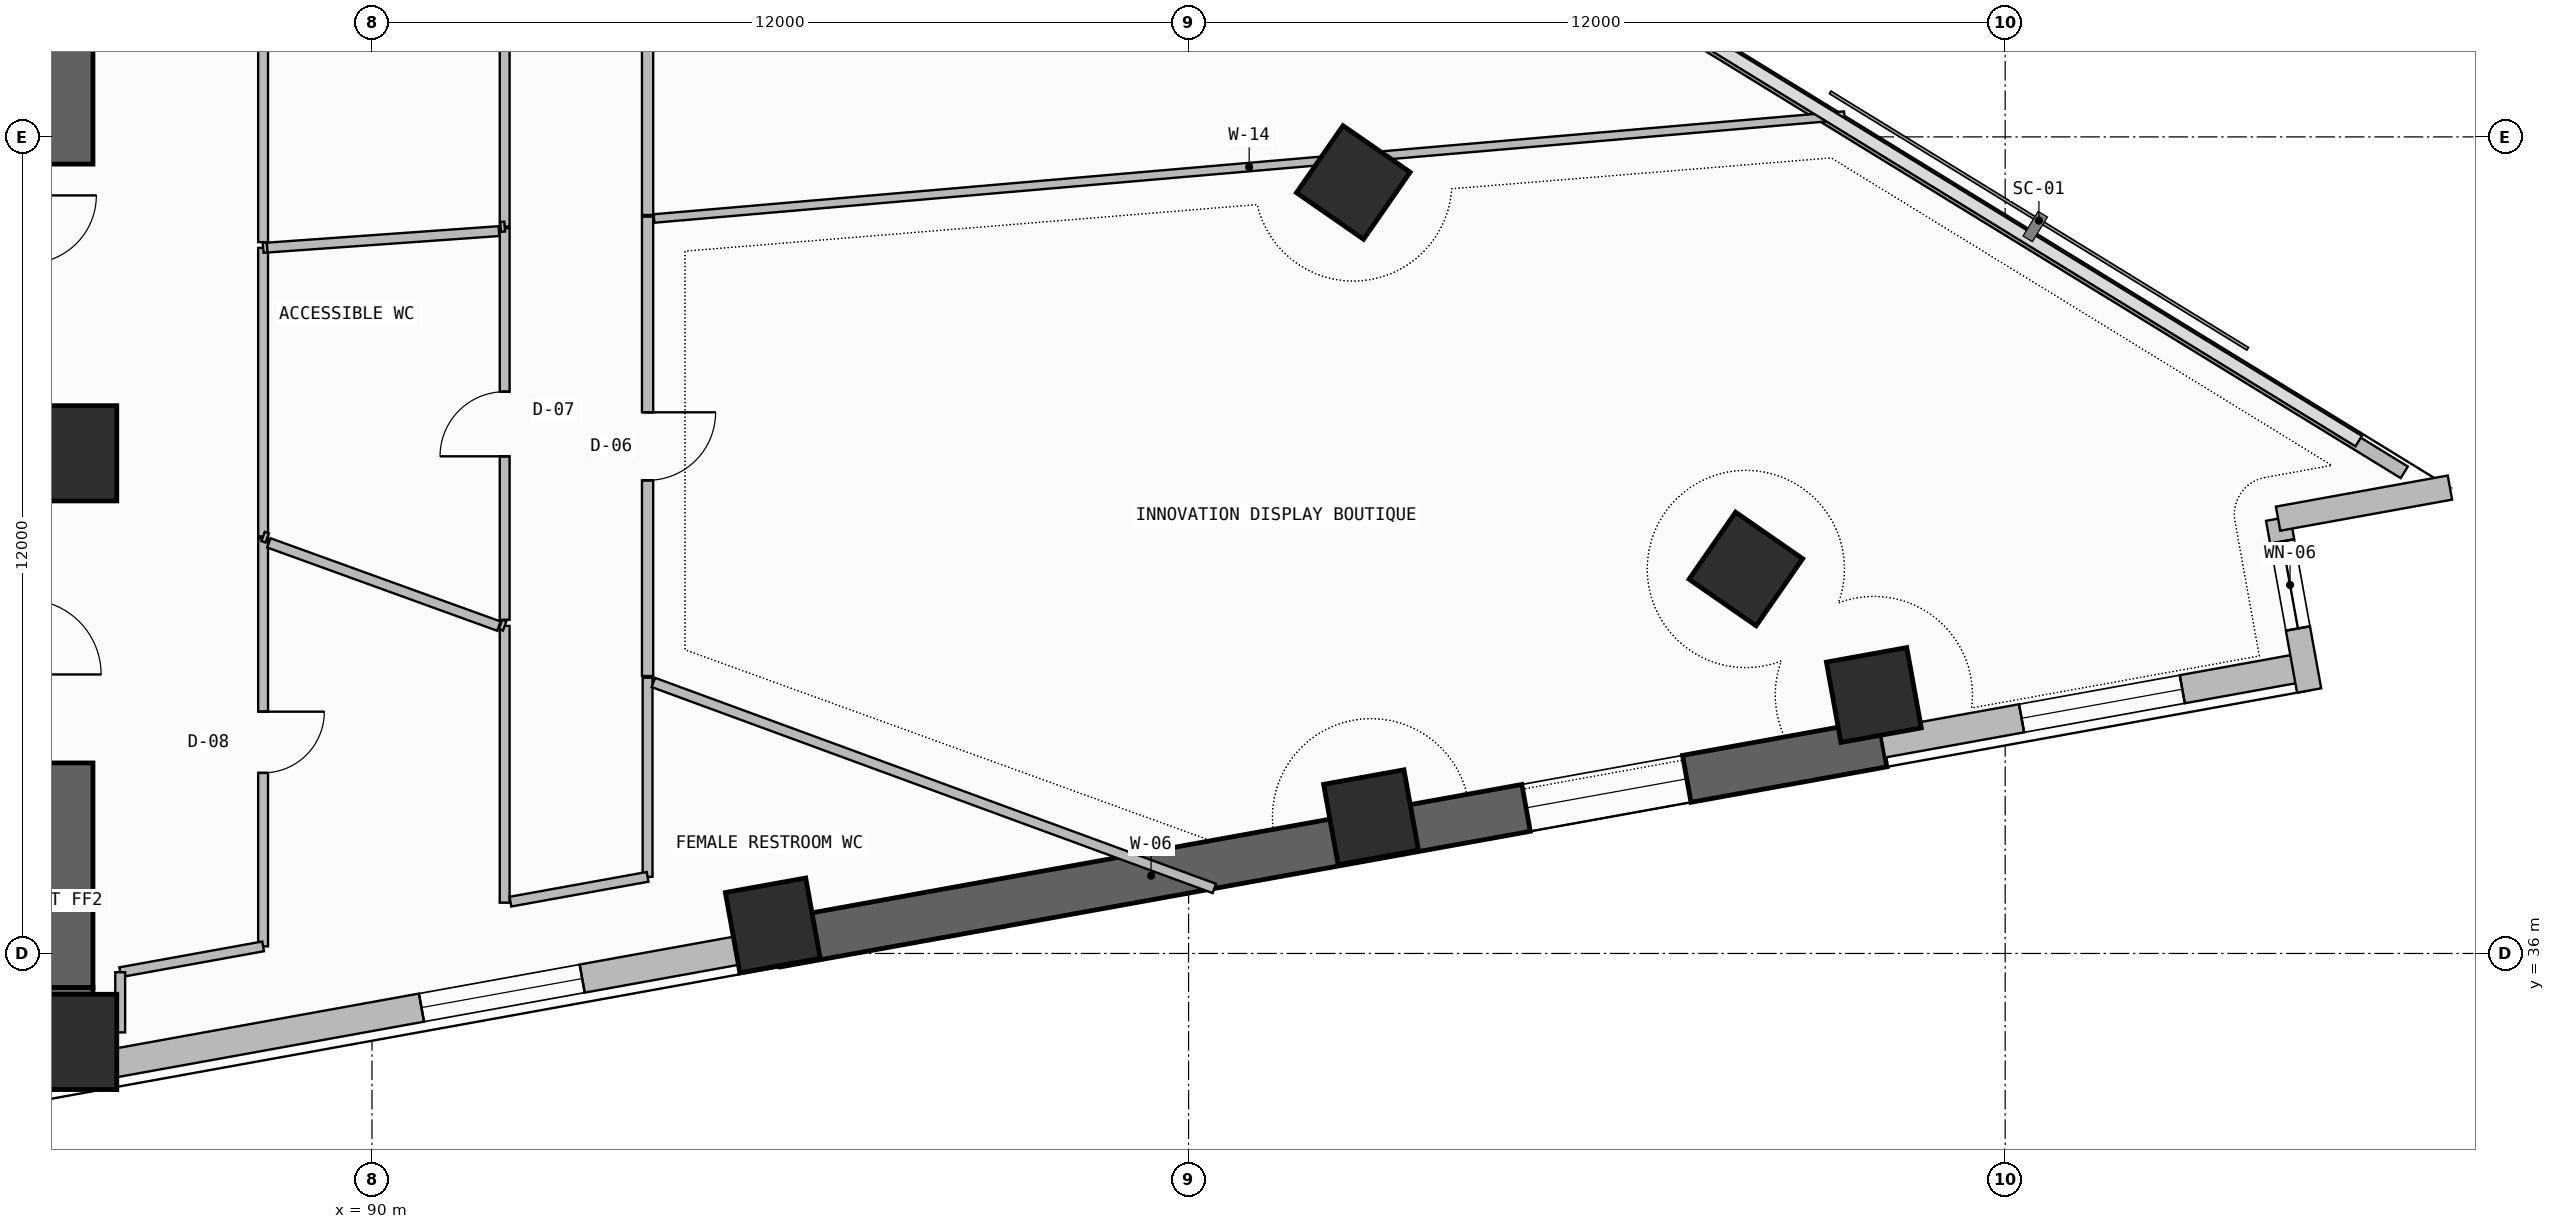
"""IFC4 building model, lengths in metres.
Left out: names, types, materials, properties, quantities, classifications, styles, units other than length and angle.
Written with IfcOpenShell. Run it as: python <this file> out.ifc"""

import sys

from ifc_helpers import new_model, si_unit, direction, frame, frame_2d, origin, origin_2d, place, context, subcontext, project, spatial, rectangle, extrude, element, fill, save


model = new_model("IFC4")
c1 = context("Model", 3, precision=1e-05, world=origin(), true_north=direction((0.0, 1.0)))
c2 = subcontext(c1, "Body", "Model", "MODEL_VIEW")
j1 = project(units=[si_unit("LENGTHUNIT", "METRE"), si_unit("PLANEANGLEUNIT", "RADIAN")], contexts=[c1])
p1 = place(None, origin())
s1 = spatial("IfcSite", under=j1, at=p1, CompositionType="ELEMENT")
p2 = place(p1, origin())
s2 = spatial("IfcBuilding", under=s1, at=p2, CompositionType="ELEMENT")
p3 = place(p2, frame((0.0, 0.0, 120.9)))
s3 = spatial("IfcBuildingStorey", under=s2, at=p3, CompositionType="ELEMENT", Elevation=120.9)
p4 = place(p3, frame((72.0, 35.05, -0.26), z_axis=(0.0, 0.0, 1.0), x_axis=(1.0, 0.0, 0.0)))
e1 = element("IfcWall", 1, at=p4, inside=s3, PredefinedType="SHEAR", context=c2, shape_type="SweptSolid", body=[
    extrude(rectangle(XDim=13.9, YDim=0.9, at=frame_2d((6.95, 0.0))), origin(), (0.0, 0.0, 1.0), 3.6),
])
p5 = place(p3, frame((85.45, 35.5, -0.26), z_axis=(0.0, 0.0, 1.0), x_axis=(0.0, 1.0, 0.0)))
e2 = element("IfcWall", 2, at=p5, inside=s3, PredefinedType="SHEAR", context=c2, shape_type="SweptSolid", body=[
    extrude(rectangle(XDim=3.3, YDim=0.9, at=frame_2d((1.65, 0.0))), origin(), (0.0, 0.0, 1.0), 3.6),
])
p6 = place(p3, frame((85.45, 47.6, -0.26), z_axis=(0.0, 0.0, 1.0), x_axis=(0.0, 1.0, 0.0)))
e3 = element("IfcWall", 3, at=p6, inside=s3, PredefinedType="SHEAR", context=c2, shape_type="SweptSolid", body=[
    extrude(rectangle(XDim=8.45, YDim=0.9, at=frame_2d((4.225, 0.0))), origin(), (0.0, 0.0, 1.0), 3.6),
])
for number, where, z_axis, x_axis in (
    (4, (85.55, 34.7, 0.0), (0.0, 0.0, 1.0), (1.0, 0.0, 0.0)),
    (5, (85.55, 43.35, 0.0), (0.0, 0.0, 1.0), (1.0, 0.0, 0.0)),
):
    element("IfcColumn", number, at=place(p3, frame(where, z_axis=z_axis, x_axis=x_axis)), inside=s3, PredefinedType="COLUMN", context=c2, shape_type="SweptSolid", body=[
        extrude(rectangle(XDim=1.4, YDim=1.4, at=origin_2d()), origin(), (0.0, 0.0, 1.0), 3.6),
    ])
for number, where, z_axis, x_axis in (
    (6, (95.89, 36.412, 0.0), (0.0, 0.0, 1.0), (0.984, 0.178, 0.0)),
    (7, (104.681, 38.001, 0.0), (0.0, 0.0, 1.0), (0.984, 0.178, 0.0)),
    (8, (112.07, 39.798, 0.0), (0.0, 0.0, 1.0), (0.984, 0.178, 0.0)),
    (9, (110.189, 41.65, 0.0), (0.0, 0.0, 1.0), (0.57, 0.822, 0.0)),
    (10, (104.42, 47.331, 0.0), (0.0, 0.0, 1.0), (0.57, 0.822, 0.0)),
):
    element("IfcColumn", number, at=place(p3, frame(where, z_axis=z_axis, x_axis=x_axis)), inside=s3, PredefinedType="COLUMN", context=c2, shape_type="SweptSolid", body=[
        extrude(rectangle(XDim=1.2, YDim=1.2, at=origin_2d()), origin(), (0.0, 0.0, 1.0), 3.6),
    ])
p7 = place(p3, frame((86.1, 34.367, 0.0), z_axis=(0.0, 0.0, 1.0), x_axis=(0.9840437071, 0.177926902172, 0.0)))
e11 = element("IfcWall", 11, at=p7, inside=s3, PredefinedType="SOLIDWALL", context=c2, shape_type="SweptSolid", body=[
    extrude(rectangle(XDim=9.997, YDim=0.42, at=frame_2d((4.999, 0.0))), origin(), (0.0, 0.0, 1.0), 2.325),
])
p8 = place(p7, frame((4.702, 0.0, 1.2)))
e12 = element("IfcOpeningElement", 12, at=p8, cuts=e11, PredefinedType="OPENING", context=c2, shape_type="SweptSolid", body=[
    extrude(rectangle(XDim=2.4, YDim=0.9, at=frame_2d((1.2, 0.45))), frame((0.0, 0.22, 0.0), z_axis=(0.0, -1.0, 0.0), x_axis=(1.0, 0.0, 0.0)), (0.0, 0.0, 1.0), 0.44),
])
p9 = place(p3, frame((95.938, 36.146, -0.26), z_axis=(0.0, 0.0, 1.0), x_axis=(0.984038488288, 0.177955762952, 0.0)))
e13 = element("IfcWall", 13, at=p9, inside=s3, PredefinedType="SHEAR", context=c2, shape_type="SweptSolid", body=[
    extrude(rectangle(XDim=16.525, YDim=0.7, at=frame_2d((8.262, 0.0))), origin(), (0.0, 0.0, 1.0), 3.6),
])
p10 = place(p9, frame((11.2, 0.0, 1.2)))
e14 = element("IfcOpeningElement", 14, at=p10, cuts=e13, PredefinedType="OPENING", context=c2, shape_type="SweptSolid", body=[
    extrude(rectangle(XDim=2.4, YDim=0.9, at=frame_2d((1.2, 0.45))), frame((0.0, 0.36, 0.0), z_axis=(0.0, -1.0, 0.0), x_axis=(1.0, 0.0, 0.0)), (0.0, 0.0, 1.0), 0.72),
])
p11 = place(p3, frame((112.199, 39.087, 0.0), z_axis=(0.0, 0.0, 1.0), x_axis=(0.984042888215, 0.177931431042, 0.0)))
e15 = element("IfcWall", 15, at=p11, inside=s3, PredefinedType="SOLIDWALL", context=c2, shape_type="SweptSolid", body=[
    extrude(rectangle(XDim=6.306, YDim=0.42, at=frame_2d((3.153, 0.0))), origin(), (0.0, 0.0, 1.0), 3.34),
])
p12 = place(p11, frame((2.075, 0.0, 1.2)))
e16 = element("IfcOpeningElement", 16, at=p12, cuts=e15, PredefinedType="OPENING", context=c2, shape_type="SweptSolid", body=[
    extrude(rectangle(XDim=2.4, YDim=0.9, at=frame_2d((1.2, 0.45))), frame((0.0, 0.22, 0.0), z_axis=(0.0, -1.0, 0.0), x_axis=(1.0, 0.0, 0.0)), (0.0, 0.0, 1.0), 0.44),
])
p13 = place(p3, frame((118.467, 39.864, 0.0), z_axis=(0.0, 0.0, 1.0), x_axis=(-0.177897493713, 0.984049024048, 0.0)))
e17 = element("IfcWall", 17, at=p13, inside=s3, PredefinedType="SOLIDWALL", context=c2, shape_type="SweptSolid", body=[
    extrude(rectangle(XDim=2.566, YDim=0.36, at=frame_2d((1.283, 0.0))), origin(), (0.0, 0.0, 1.0), 3.34),
])
p14 = place(p13, frame((0.926, 0.0, 0.45)))
e18 = element("IfcOpeningElement", 18, at=p14, cuts=e17, PredefinedType="OPENING", context=c2, shape_type="SweptSolid", body=[
    extrude(rectangle(XDim=1.3, YDim=2.4, at=frame_2d((0.65, 1.2))), frame((0.0, 0.19, 0.0), z_axis=(0.0, -1.0, 0.0), x_axis=(1.0, 0.0, 0.0)), (0.0, 0.0, 1.0), 0.38),
])
p15 = place(p3, frame((118.01, 42.39, 0.0), z_axis=(0.0, 0.0, 1.0), x_axis=(0.984046012923, 0.177914149102, 0.0)))
e19 = element("IfcWall", 19, at=p15, inside=s3, PredefinedType="SOLIDWALL", context=c2, shape_type="SweptSolid", body=[
    extrude(rectangle(XDim=2.566, YDim=0.36, at=frame_2d((1.283, 0.0))), origin(), (0.0, 0.0, 1.0), 3.34),
])
p16 = place(p3, frame((119.865, 43.07, 0.0), z_axis=(0.0, 0.0, 1.0), x_axis=(-0.852110824326, 0.52336138859, 0.0)))
e20 = element("IfcWall", 20, at=p16, inside=s3, PredefinedType="PARAPET", context=c2, shape_type="SweptSolid", body=[
    extrude(rectangle(XDim=33.932, YDim=0.2, at=frame_2d((16.966, 0.0))), origin(), (0.0, 0.0, 1.0), 1.15),
])
p17 = place(p3, frame((88.4, 36.104, 0.0), z_axis=(0.0, 0.0, 1.0), x_axis=(0.0, 1.0, 0.0)))
e21 = element("IfcWall", 21, at=p17, inside=s3, PredefinedType="PARTITIONING", context=c2, shape_type="SweptSolid", body=[
    extrude(rectangle(XDim=5.999, YDim=0.145, at=frame_2d((2.999, 0.0))), origin(), (0.0, 0.0, 1.0), 3.34),
])
p18 = place(p17, frame((2.549, 0.0, 0.0)))
e22 = element("IfcOpeningElement", 22, at=p18, cuts=e21, PredefinedType="OPENING", context=c2, shape_type="SweptSolid", body=[
    extrude(rectangle(XDim=0.9, YDim=2.1, at=frame_2d((0.45, 1.05))), frame((0.0, 0.083, 0.0), z_axis=(0.0, -1.0, 0.0), x_axis=(1.0, 0.0, 0.0)), (0.0, 0.0, 1.0), 0.165),
])
p19 = place(p3, frame((91.95, 40.814, 0.0), z_axis=(0.0, 0.0, 1.0), x_axis=(0.0, -1.0, 0.0)))
e23 = element("IfcWall", 23, at=p19, inside=s3, PredefinedType="PARTITIONING", context=c2, shape_type="SweptSolid", body=[
    extrude(rectangle(XDim=4.068, YDim=0.145, at=frame_2d((2.034, 0.0))), origin(), (0.0, 0.0, 1.0), 2.875),
])
p20 = place(p3, frame((94.05, 37.126, 0.0), z_axis=(0.0, 0.0, 1.0), x_axis=(0.0, 1.0, 0.0)))
e24 = element("IfcWall", 24, at=p20, inside=s3, PredefinedType="PARTITIONING", context=c2, shape_type="SweptSolid", body=[
    extrude(rectangle(XDim=2.926, YDim=0.145, at=frame_2d((1.463, 0.0))), origin(), (0.0, 0.0, 1.0), 2.875),
])
p21 = place(p3, frame((92.034, 36.761, 0.0), z_axis=(0.0, 0.0, 1.0), x_axis=(0.984039194934, 0.177951855382, 0.0)))
e25 = element("IfcWall", 25, at=p21, inside=s3, PredefinedType="PARTITIONING", context=c2, shape_type="SweptSolid", body=[
    extrude(rectangle(XDim=2.048, YDim=0.145, at=frame_2d((1.024, 0.0))), origin(), (0.0, 0.0, 1.0), 3.34),
])
p22 = place(p3, frame((86.3, 35.724, 0.0), z_axis=(0.0, 0.0, 1.0), x_axis=(0.984046990905, 0.177908739781, 0.0)))
e26 = element("IfcWall", 26, at=p22, inside=s3, PredefinedType="PARTITIONING", context=c2, shape_type="SweptSolid", body=[
    extrude(rectangle(XDim=2.134, YDim=0.145, at=frame_2d((1.067, 0.0))), origin(), (0.0, 0.0, 1.0), 3.34),
])
p23 = place(p3, frame((91.89, 40.836, 0.0), z_axis=(0.0, 0.0, 1.0), x_axis=(0.940350208768, -0.340208002359, 0.0)))
e27 = element("IfcWall", 27, at=p23, inside=s3, PredefinedType="PARTITIONING", context=c2, shape_type="SweptSolid", body=[
    extrude(rectangle(XDim=0.064, YDim=0.145, at=frame_2d((0.032, 0.0))), origin(), (0.0, 0.0, 1.0), 3.34),
])
p24 = place(p3, frame((88.485, 42.034, 0.0), z_axis=(0.0, 0.0, 1.0), x_axis=(0.940329543341, -0.340265117106, 0.0)))
e28 = element("IfcWall", 28, at=p24, inside=s3, PredefinedType="PARTITIONING", context=c2, shape_type="SweptSolid", body=[
    extrude(rectangle(XDim=3.595, YDim=0.145, at=frame_2d((1.798, 0.0))), origin(), (0.0, 0.0, 1.0), 3.34),
])
p25 = place(p3, frame((94.135, 39.982, 0.0), z_axis=(0.0, 0.0, 1.0), x_axis=(0.938707581667, -0.344714484931, 0.0)))
e29 = element("IfcWall", 29, at=p25, inside=s3, PredefinedType="PARTITIONING", context=c2, shape_type="SweptSolid", body=[
    extrude(rectangle(XDim=8.782, YDim=0.145, at=frame_2d((4.391, 0.0))), origin(), (0.0, 0.0, 1.0), 2.325),
])
p26 = place(p3, frame((91.95, 46.657, 0.0), z_axis=(0.0, 0.0, 1.0), x_axis=(0.0, -1.0, 0.0)))
e30 = element("IfcWall", 30, at=p26, inside=s3, PredefinedType="PARTITIONING", context=c2, shape_type="SweptSolid", body=[
    extrude(rectangle(XDim=5.754, YDim=0.145, at=frame_2d((2.877, 0.0))), origin(), (0.0, 0.0, 1.0), 2.725),
])
p27 = place(p26, frame((2.402, 0.0, 0.0)))
e31 = element("IfcOpeningElement", 31, at=p27, cuts=e30, PredefinedType="OPENING", context=c2, shape_type="SweptSolid", body=[
    extrude(rectangle(XDim=0.95, YDim=2.15, at=frame_2d((0.475, 1.075))), frame((0.0, 0.083, 0.0), z_axis=(0.0, -1.0, 0.0), x_axis=(1.0, 0.0, 0.0)), (0.0, 0.0, 1.0), 0.165),
])
p28 = place(p3, frame((88.4, 42.128, 0.0), z_axis=(0.0, 0.0, 1.0), x_axis=(0.0, 1.0, 0.0)))
e32 = element("IfcWall", 32, at=p28, inside=s3, PredefinedType="PARTITIONING", context=c2, shape_type="SweptSolid", body=[
    extrude(rectangle(XDim=4.241, YDim=0.145, at=frame_2d((2.12, 0.0))), origin(), (0.0, 0.0, 1.0), 2.725),
])
p29 = place(p3, frame((88.46, 42.106, 0.0), z_axis=(0.0, 0.0, 1.0), x_axis=(-0.940350208768, 0.340208002359, 0.0)))
e33 = element("IfcWall", 33, at=p29, inside=s3, PredefinedType="PARTITIONING", context=c2, shape_type="SweptSolid", body=[
    extrude(rectangle(XDim=0.064, YDim=0.145, at=frame_2d((0.032, 0.0))), origin(), (0.0, 0.0, 1.0), 3.34),
])
p30 = place(p3, frame((88.4, 46.369, 0.0), z_axis=(0.0, 0.0, 1.0), x_axis=(0.996711382833, 0.081033445759, 0.0)))
e34 = element("IfcWall", 34, at=p30, inside=s3, PredefinedType="PARTITIONING", context=c2, shape_type="SweptSolid", body=[
    extrude(rectangle(XDim=0.06, YDim=0.145, at=frame_2d((0.03, 0.0))), origin(), (0.0, 0.0, 1.0), 3.34),
])
p31 = place(p3, frame((88.46, 46.373, 0.0), z_axis=(0.0, 0.0, 1.0), x_axis=(0.997475371103, 0.071013266669, 0.0)))
e35 = element("IfcWall", 35, at=p31, inside=s3, PredefinedType="PARTITIONING", context=c2, shape_type="SweptSolid", body=[
    extrude(rectangle(XDim=3.414, YDim=0.145, at=frame_2d((1.707, 0.0))), origin(), (0.0, 0.0, 1.0), 3.34),
])
p32 = place(p3, frame((94.05, 40.077, 0.0), z_axis=(0.0, 0.0, 1.0), x_axis=(0.0, 1.0, 0.0)))
e36 = element("IfcWall", 36, at=p32, inside=s3, PredefinedType="PARTITIONING", context=c2, shape_type="SweptSolid", body=[
    extrude(rectangle(XDim=6.751, YDim=0.165, at=frame_2d((3.375, 0.0))), origin(), (0.0, 0.0, 1.0), 2.725),
])
p33 = place(p32, frame((2.875, 0.0, 0.0)))
e37 = element("IfcOpeningElement", 37, at=p33, cuts=e36, PredefinedType="OPENING", context=c2, shape_type="SweptSolid", body=[
    extrude(rectangle(XDim=1.0, YDim=2.2, at=frame_2d((0.5, 1.1))), frame((0.0, 0.093, 0.0), z_axis=(0.0, -1.0, 0.0), x_axis=(1.0, 0.0, 0.0)), (0.0, 0.0, 1.0), 0.185),
])
p34 = place(p3, frame((94.145, 46.801, 0.0), z_axis=(0.0, 0.0, 1.0), x_axis=(0.996288543636, 0.086076348786, 0.0)))
e38 = element("IfcWall", 38, at=p34, inside=s3, PredefinedType="PARTITIONING", context=c2, shape_type="SweptSolid", body=[
    extrude(rectangle(XDim=17.557, YDim=0.125, at=frame_2d((8.778, 0.0))), origin(), (0.0, 0.0, 1.0), 2.725),
])
p35 = place(p3, frame((94.05, 46.852, 0.0), z_axis=(0.0, 0.0, 1.0), x_axis=(0.0, 1.0, 0.0)))
e39 = element("IfcWall", 39, at=p35, inside=s3, PredefinedType="PARTITIONING", context=c2, shape_type="SweptSolid", body=[
    extrude(rectangle(XDim=11.674, YDim=0.165, at=frame_2d((5.837, 0.0))), origin(), (0.0, 0.0, 1.0), 2.725),
])
p36 = place(p35, frame((5.337, 0.0, 0.0)))
e40 = element("IfcOpeningElement", 40, at=p36, cuts=e39, PredefinedType="OPENING", context=c2, shape_type="SweptSolid", body=[
    extrude(rectangle(XDim=1.0, YDim=2.2, at=frame_2d((0.5, 1.1))), frame((0.0, 0.093, 0.0), z_axis=(0.0, -1.0, 0.0), x_axis=(1.0, 0.0, 0.0)), (0.0, 0.0, 1.0), 0.185),
])
p37 = place(p3, frame((88.4, 46.454, 0.0), z_axis=(0.0, 0.0, 1.0), x_axis=(0.0, 1.0, 0.0)))
e41 = element("IfcWall", 41, at=p37, inside=s3, PredefinedType="PARTITIONING", context=c2, shape_type="SweptSolid", body=[
    extrude(rectangle(XDim=9.884, YDim=0.145, at=frame_2d((4.942, 0.0))), origin(), (0.0, 0.0, 1.0), 2.725),
])
p38 = place(p37, frame((4.492, 0.0, 0.0)))
e42 = element("IfcOpeningElement", 42, at=p38, cuts=e41, PredefinedType="OPENING", context=c2, shape_type="SweptSolid", body=[
    extrude(rectangle(XDim=0.9, YDim=2.1, at=frame_2d((0.45, 1.05))), frame((0.0, 0.083, 0.0), z_axis=(0.0, -1.0, 0.0), x_axis=(1.0, 0.0, 0.0)), (0.0, 0.0, 1.0), 0.165),
])
p39 = place(p3, frame((91.95, 56.35, 0.0), z_axis=(0.0, 0.0, 1.0), x_axis=(0.0, -1.0, 0.0)))
e43 = element("IfcWall", 43, at=p39, inside=s3, PredefinedType="PARTITIONING", context=c2, shape_type="SweptSolid", body=[
    extrude(rectangle(XDim=9.668, YDim=0.145, at=frame_2d((4.834, 0.0))), origin(), (0.0, 0.0, 1.0), 2.725),
])
p40 = place(p3, frame((91.95, 46.682, 0.0), z_axis=(0.0, 0.0, 1.0), x_axis=(-0.996711382833, -0.081033445759, 0.0)))
e44 = element("IfcWall", 44, at=p40, inside=s3, PredefinedType="PARTITIONING", context=c2, shape_type="SweptSolid", body=[
    extrude(rectangle(XDim=0.06, YDim=0.145, at=frame_2d((0.03, 0.0))), origin(), (0.0, 0.0, 1.0), 3.34),
])
p41 = place(p3, frame((86.3, 34.84, 0.0), z_axis=(0.0, 0.0, 1.0), x_axis=(0.0, 1.0, 0.0)))
e45 = element("IfcWall", 45, at=p41, inside=s3, PredefinedType="PARTITIONING", context=c2, shape_type="SweptSolid", body=[
    extrude(rectangle(XDim=0.884, YDim=0.145, at=frame_2d((0.442, 0.0))), origin(), (0.0, 0.0, 1.0), 2.725),
])
p42 = place(p8, origin())
e46 = element("IfcWindow", 46, at=p42, inside=s3, PartitioningType="SINGLE_PANEL", PredefinedType="WINDOW", context=c2, shape_type="SweptSolid", body=[
    extrude(rectangle(XDim=2.4, YDim=0.9, at=frame_2d((1.2, 0.45))), frame((0.0, 0.03, 0.0), z_axis=(0.0, -1.0, 0.0), x_axis=(1.0, 0.0, 0.0)), (0.0, 0.0, 1.0), 0.06),
])
fill(e12, e46)
p43 = place(p10, origin())
e47 = element("IfcWindow", 47, at=p43, inside=s3, PartitioningType="SINGLE_PANEL", PredefinedType="WINDOW", context=c2, shape_type="SweptSolid", body=[
    extrude(rectangle(XDim=2.4, YDim=0.9, at=frame_2d((1.2, 0.45))), frame((0.0, 0.03, 0.0), z_axis=(0.0, -1.0, 0.0), x_axis=(1.0, 0.0, 0.0)), (0.0, 0.0, 1.0), 0.06),
])
fill(e14, e47)
p44 = place(p12, origin())
e48 = element("IfcWindow", 48, at=p44, inside=s3, PartitioningType="SINGLE_PANEL", PredefinedType="WINDOW", context=c2, shape_type="SweptSolid", body=[
    extrude(rectangle(XDim=2.4, YDim=0.9, at=frame_2d((1.2, 0.45))), frame((0.0, 0.03, 0.0), z_axis=(0.0, -1.0, 0.0), x_axis=(1.0, 0.0, 0.0)), (0.0, 0.0, 1.0), 0.06),
])
fill(e16, e48)
p45 = place(p14, origin())
e49 = element("IfcWindow", 49, at=p45, inside=s3, PartitioningType="SINGLE_PANEL", PredefinedType="WINDOW", context=c2, shape_type="SweptSolid", body=[
    extrude(rectangle(XDim=1.3, YDim=2.4, at=frame_2d((0.65, 1.2))), frame((0.0, 0.03, 0.0), z_axis=(0.0, -1.0, 0.0), x_axis=(1.0, 0.0, 0.0)), (0.0, 0.0, 1.0), 0.06),
])
fill(e18, e49)
p46 = place(p18, frame((0.9, 0.0, 0.0), z_axis=(0.0, 0.0, 1.0), x_axis=(-1.0, 0.0, 0.0)))
e50 = element("IfcDoor", 50, at=p46, inside=s3, OperationType="SINGLE_SWING_LEFT", PredefinedType="DOOR", context=c2, shape_type="SweptSolid", body=[
    extrude(rectangle(XDim=0.9, YDim=2.1, at=frame_2d((0.45, 1.05))), frame((0.0, 0.025, 0.0), z_axis=(0.0, -1.0, 0.0), x_axis=(1.0, 0.0, 0.0)), (0.0, 0.0, 1.0), 0.05),
])
fill(e22, e50)
p47 = place(p27, frame((0.95, 0.0, 0.0), z_axis=(0.0, 0.0, 1.0), x_axis=(-1.0, 0.0, 0.0)))
e51 = element("IfcDoor", 51, at=p47, inside=s3, OperationType="SINGLE_SWING_LEFT", PredefinedType="DOOR", context=c2, shape_type="SweptSolid", body=[
    extrude(rectangle(XDim=0.95, YDim=2.15, at=frame_2d((0.475, 1.075))), frame((0.0, 0.025, 0.0), z_axis=(0.0, -1.0, 0.0), x_axis=(1.0, 0.0, 0.0)), (0.0, 0.0, 1.0), 0.05),
])
fill(e31, e51)
p48 = place(p33, frame((1.0, 0.0, 0.0), z_axis=(0.0, 0.0, 1.0), x_axis=(-1.0, 0.0, 0.0)))
e52 = element("IfcDoor", 52, at=p48, inside=s3, OperationType="SINGLE_SWING_LEFT", PredefinedType="DOOR", context=c2, shape_type="SweptSolid", body=[
    extrude(rectangle(XDim=1.0, YDim=2.2, at=frame_2d((0.5, 1.1))), frame((0.0, 0.025, 0.0), z_axis=(0.0, -1.0, 0.0), x_axis=(1.0, 0.0, 0.0)), (0.0, 0.0, 1.0), 0.05),
])
fill(e37, e52)
save(model, sys.argv[1])
